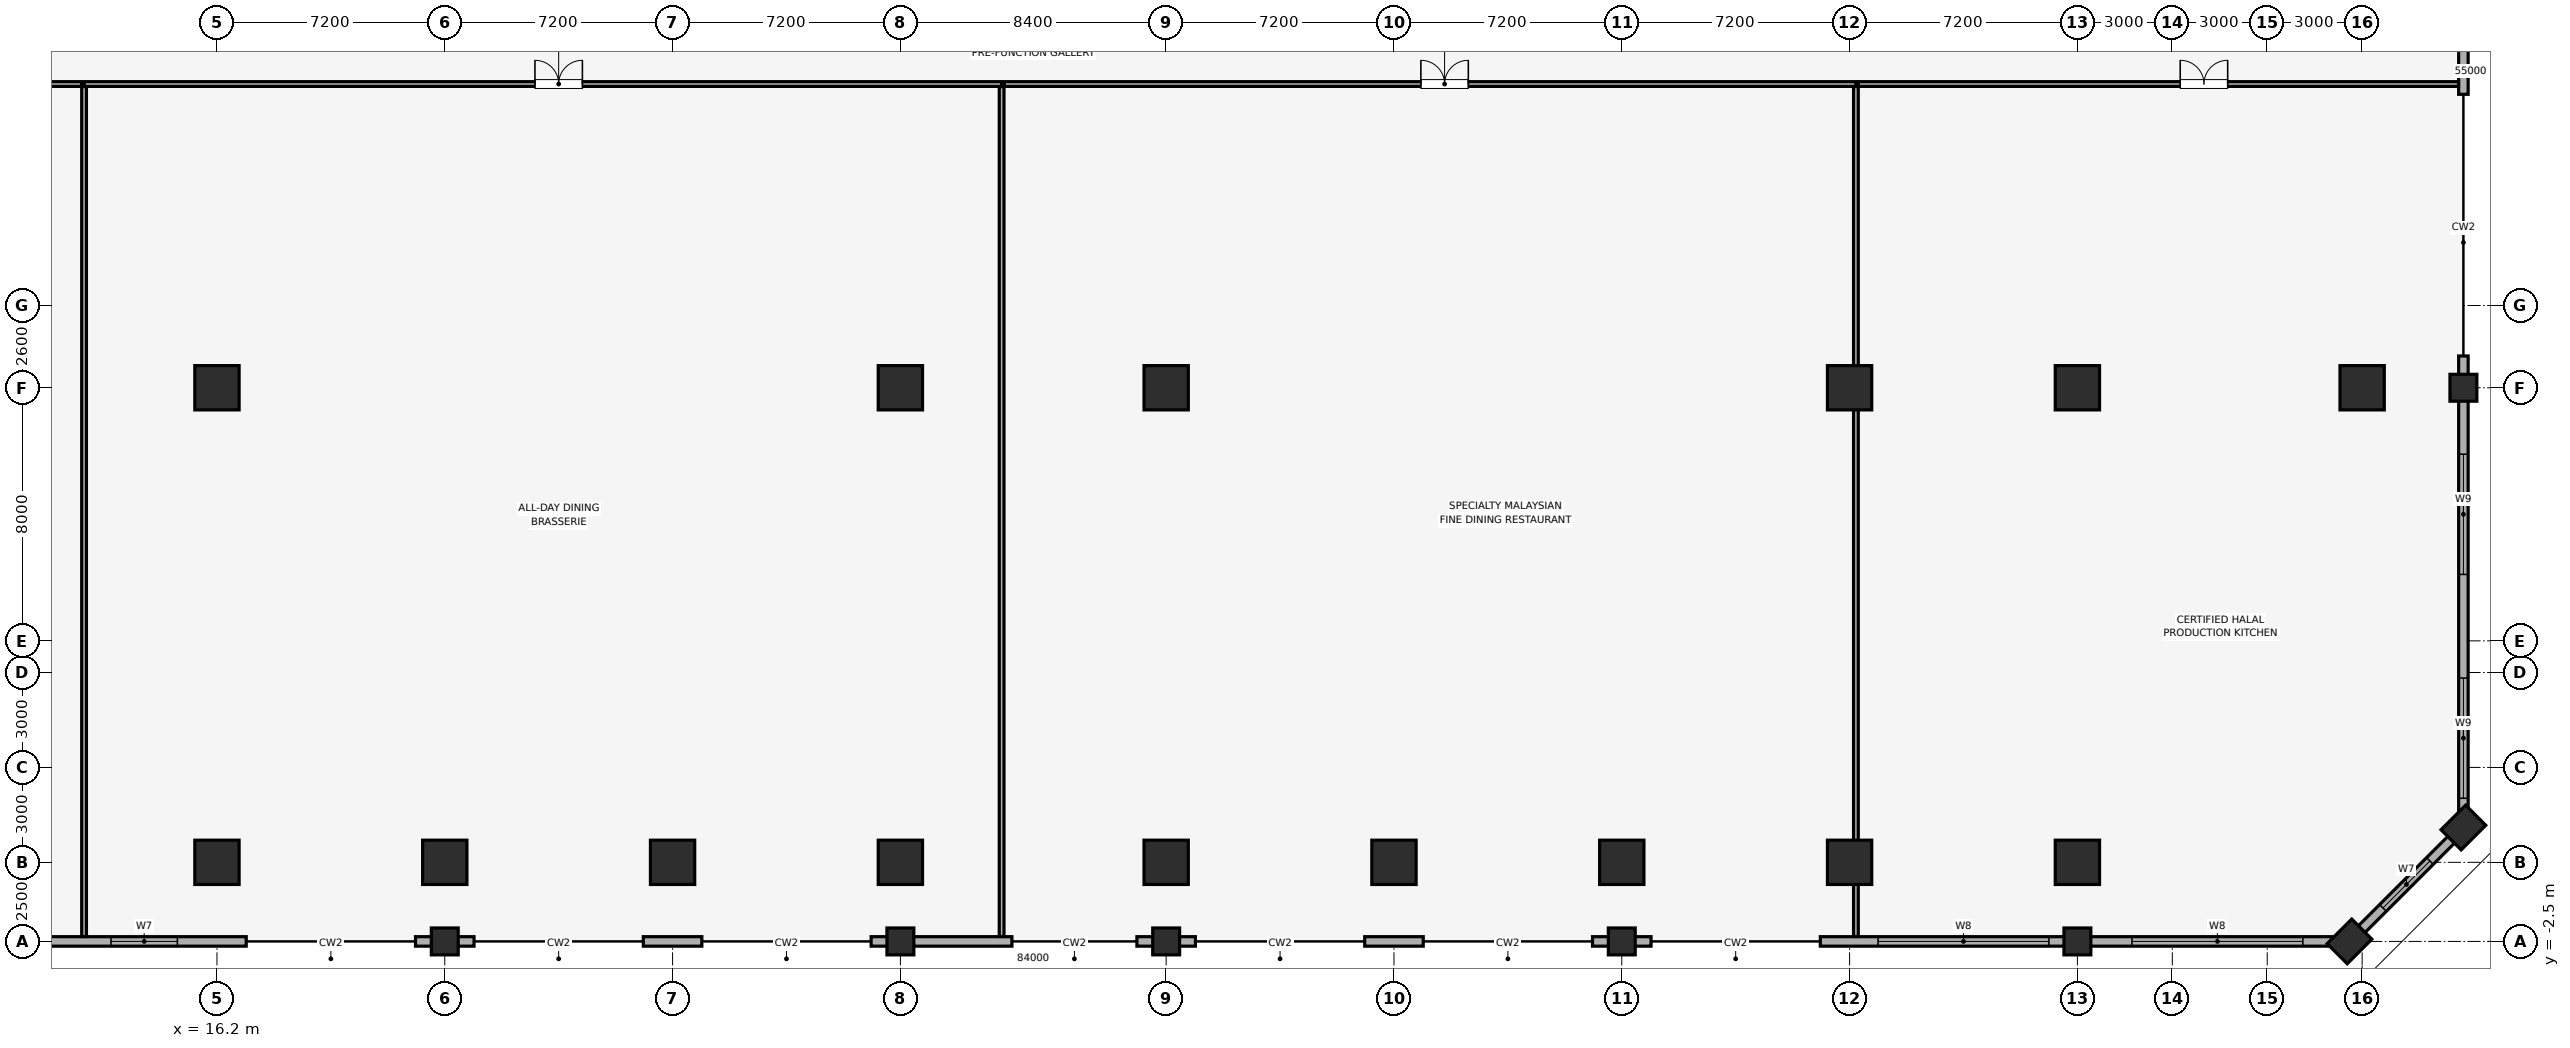
"""IFC4 building model, lengths in metres.
Left out: names, types, materials, properties, quantities, classifications, styles, units other than length and angle.
Written with IfcOpenShell. Run it as: python <this file> out.ifc"""

import sys

from ifc_helpers import new_model, si_unit, direction, frame, frame_2d, origin, origin_2d, place, context, subcontext, project, spatial, rectangle, extrude, element, fill, save


model = new_model("IFC4")
c1 = context("Model", 3, precision=1e-05, world=origin(), true_north=direction((0.0, 1.0)))
c2 = subcontext(c1, "Body", "Model", "MODEL_VIEW")
j1 = project(units=[si_unit("LENGTHUNIT", "METRE"), si_unit("PLANEANGLEUNIT", "RADIAN")], contexts=[c1])
p1 = place(None, origin())
s1 = spatial("IfcSite", under=j1, at=p1, CompositionType="ELEMENT")
p2 = place(p1, origin())
s2 = spatial("IfcBuilding", under=s1, at=p2, CompositionType="ELEMENT")
p3 = place(p2, frame((0.0, 0.0, 14.0)))
s3 = spatial("IfcBuildingStorey", under=s2, at=p3, CompositionType="ELEMENT", Elevation=14.0)
for number, where, z_axis, x_axis in (
    (1, (23.4, -2.5, 0.0), (0.0, 0.0, 1.0), (1.0, 0.0, 0.0)),
    (2, (37.8, -2.5, 0.0), (0.0, 0.0, 1.0), (1.0, 0.0, 0.0)),
    (3, (46.2, -2.5, 0.0), (0.0, 0.0, 1.0), (1.0, 0.0, 0.0)),
    (4, (60.6, -2.5, 0.0), (0.0, 0.0, 1.0), (1.0, 0.0, 0.0)),
    (5, (75.0, -2.5, 0.0), (0.0, 0.0, 1.0), (1.0, 0.0, 0.0)),
    (6, (87.2, 15.0, 0.0), (0.0, 0.0, 1.0), (1.0, 0.0, 0.0)),
):
    element("IfcColumn", number, at=place(p3, frame(where, z_axis=z_axis, x_axis=x_axis)), inside=s3, PredefinedType="COLUMN", context=c2, shape_type="SweptSolid", body=[
        extrude(rectangle(XDim=0.85, YDim=0.85, at=origin_2d()), origin(), (0.0, 0.0, 1.0), 5.08),
    ])
for number, where, z_axis, x_axis in (
    (7, (83.6, -2.5, 0.0), (0.0, 0.0, 1.0), (0.707, 0.707, 0.0)),
    (8, (87.2, 1.1, 0.0), (0.0, 0.0, 1.0), (0.707, 0.707, 0.0)),
):
    element("IfcColumn", number, at=place(p3, frame(where, z_axis=z_axis, x_axis=x_axis)), inside=s3, PredefinedType="PILASTER", context=c2, shape_type="SweptSolid", body=[
        extrude(rectangle(XDim=1.1, YDim=0.9, at=origin_2d()), origin(), (0.0, 0.0, 1.0), 5.08),
    ])
for number, where, z_axis, x_axis in (
    (9, (16.2, 0.0, 0.0), (0.0, 0.0, 1.0), (1.0, 0.0, 0.0)),
    (10, (23.4, 0.0, 0.0), (0.0, 0.0, 1.0), (1.0, 0.0, 0.0)),
    (11, (30.6, 0.0, 0.0), (0.0, 0.0, 1.0), (1.0, 0.0, 0.0)),
    (12, (37.8, 0.0, 0.0), (0.0, 0.0, 1.0), (1.0, 0.0, 0.0)),
    (13, (46.2, 0.0, 0.0), (0.0, 0.0, 1.0), (1.0, 0.0, 0.0)),
    (14, (53.4, 0.0, 0.0), (0.0, 0.0, 1.0), (1.0, 0.0, 0.0)),
    (15, (60.6, 0.0, 0.0), (0.0, 0.0, 1.0), (1.0, 0.0, 0.0)),
    (16, (67.8, 0.0, 0.0), (0.0, 0.0, 1.0), (1.0, 0.0, 0.0)),
    (17, (75.0, 0.0, 0.0), (0.0, 0.0, 1.0), (1.0, 0.0, 0.0)),
    (18, (37.8, 15.0, 0.0), (0.0, 0.0, 1.0), (1.0, 0.0, 0.0)),
    (19, (46.2, 15.0, 0.0), (0.0, 0.0, 1.0), (1.0, 0.0, 0.0)),
    (20, (75.0, 15.0, 0.0), (0.0, 0.0, 1.0), (1.0, 0.0, 0.0)),
    (21, (16.2, 15.0, 0.0), (0.0, 0.0, 1.0), (1.0, 0.0, 0.0)),
    (22, (67.8, 15.0, 0.0), (0.0, 0.0, 1.0), (1.0, 0.0, 0.0)),
    (23, (84.0, 15.0, 0.0), (0.0, 0.0, 1.0), (1.0, 0.0, 0.0)),
):
    element("IfcColumn", number, at=place(p3, frame(where, z_axis=z_axis, x_axis=x_axis)), inside=s3, PredefinedType="COLUMN", context=c2, shape_type="SweptSolid", body=[
        extrude(rectangle(XDim=1.4, YDim=1.4, at=origin_2d()), origin(), (0.0, 0.0, 1.0), 5.08),
    ])
p4 = place(p3, frame((0.4, -2.5, 0.0), z_axis=(0.0, 0.0, 1.0), x_axis=(1.0, 0.0, 0.0)))
e24 = element("IfcWall", 24, at=p4, inside=s3, PredefinedType="SOLIDWALL", context=c2, shape_type="SweptSolid", body=[
    extrude(rectangle(XDim=16.725, YDim=0.3, at=frame_2d((8.363, 0.0))), origin(), (0.0, 0.0, 1.0), 4.13),
])
p5 = place(p4, frame((1.475, 0.0, 0.85)))
e25 = element("IfcOpeningElement", 25, at=p5, cuts=e24, PredefinedType="OPENING", context=c2, shape_type="SweptSolid", body=[
    extrude(rectangle(XDim=5.4, YDim=2.4, at=frame_2d((2.7, 1.2))), frame((0.0, 0.16, 0.0), z_axis=(0.0, -1.0, 0.0), x_axis=(1.0, 0.0, 0.0)), (0.0, 0.0, 1.0), 0.32),
])
p6 = place(p4, frame((12.45, 0.0, 0.85)))
e26 = element("IfcOpeningElement", 26, at=p6, cuts=e24, PredefinedType="OPENING", context=c2, shape_type="SweptSolid", body=[
    extrude(rectangle(XDim=2.1, YDim=1.6, at=frame_2d((1.05, 0.8))), frame((0.0, 0.16, 0.0), z_axis=(0.0, -1.0, 0.0), x_axis=(1.0, 0.0, 0.0)), (0.0, 0.0, 1.0), 0.32),
])
for number, where, z_axis, x_axis in (
    (27, (22.475, -2.5, 0.0), (0.0, 0.0, 1.0), (1.0, 0.0, 0.0)),
    (28, (29.675, -2.5, 0.0), (0.0, 0.0, 1.0), (1.0, 0.0, 0.0)),
):
    element("IfcWall", number, at=place(p3, frame(where, z_axis=z_axis, x_axis=x_axis)), inside=s3, PredefinedType="SOLIDWALL", context=c2, shape_type="SweptSolid", body=[
        extrude(rectangle(XDim=1.85, YDim=0.3, at=frame_2d((0.925, 0.0))), origin(), (0.0, 0.0, 1.0), 4.13),
    ])
p7 = place(p3, frame((36.875, -2.5, 0.0), z_axis=(0.0, 0.0, 1.0), x_axis=(1.0, 0.0, 0.0)))
e29 = element("IfcWall", 29, at=p7, inside=s3, PredefinedType="SOLIDWALL", context=c2, shape_type="SweptSolid", body=[
    extrude(rectangle(XDim=4.45, YDim=0.3, at=frame_2d((2.225, 0.0))), origin(), (0.0, 0.0, 1.0), 4.13),
])
p8 = place(p3, frame((45.275, -2.5, 0.0), z_axis=(0.0, 0.0, 1.0), x_axis=(1.0, 0.0, 0.0)))
e30 = element("IfcWall", 30, at=p8, inside=s3, PredefinedType="SOLIDWALL", context=c2, shape_type="SweptSolid", body=[
    extrude(rectangle(XDim=1.85, YDim=0.3, at=frame_2d((0.925, 0.0))), origin(), (0.0, 0.0, 1.0), 4.13),
])
for number, where, z_axis, x_axis in (
    (31, (52.475, -2.5, 0.0), (0.0, 0.0, 1.0), (1.0, 0.0, 0.0)),
    (32, (59.675, -2.5, 0.0), (0.0, 0.0, 1.0), (1.0, 0.0, 0.0)),
):
    element("IfcWall", number, at=place(p3, frame(where, z_axis=z_axis, x_axis=x_axis)), inside=s3, PredefinedType="SOLIDWALL", context=c2, shape_type="SweptSolid", body=[
        extrude(rectangle(XDim=1.85, YDim=0.3, at=frame_2d((0.925, 0.0))), origin(), (0.0, 0.0, 1.0), 4.13),
    ])
p9 = place(p3, frame((66.875, -2.5, 0.0), z_axis=(0.0, 0.0, 1.0), x_axis=(1.0, 0.0, 0.0)))
e33 = element("IfcWall", 33, at=p9, inside=s3, PredefinedType="SOLIDWALL", context=c2, shape_type="SweptSolid", body=[
    extrude(rectangle(XDim=16.725, YDim=0.3, at=frame_2d((8.363, 0.0))), origin(), (0.0, 0.0, 1.0), 4.13),
])
p10 = place(p9, frame((1.825, 0.0, 0.85)))
e34 = element("IfcOpeningElement", 34, at=p10, cuts=e33, PredefinedType="OPENING", context=c2, shape_type="SweptSolid", body=[
    extrude(rectangle(XDim=5.4, YDim=2.4, at=frame_2d((2.7, 1.2))), frame((0.0, 0.16, 0.0), z_axis=(0.0, -1.0, 0.0), x_axis=(1.0, 0.0, 0.0)), (0.0, 0.0, 1.0), 0.32),
])
p11 = place(p9, frame((9.85, 0.0, 0.85)))
e35 = element("IfcOpeningElement", 35, at=p11, cuts=e33, PredefinedType="OPENING", context=c2, shape_type="SweptSolid", body=[
    extrude(rectangle(XDim=5.4, YDim=2.4, at=frame_2d((2.7, 1.2))), frame((0.0, 0.16, 0.0), z_axis=(0.0, -1.0, 0.0), x_axis=(1.0, 0.0, 0.0)), (0.0, 0.0, 1.0), 0.32),
])
p12 = place(p3, frame((83.6, -2.5, 0.0), z_axis=(0.0, 0.0, 1.0), x_axis=(0.707082803744, 0.707130757816, 0.0)))
e36 = element("IfcWall", 36, at=p12, inside=s3, PredefinedType="SOLIDWALL", context=c2, shape_type="SweptSolid", body=[
    extrude(rectangle(XDim=5.091, YDim=0.3, at=frame_2d((2.545, 0.0))), origin(), (0.0, 0.0, 1.0), 4.13),
])
p13 = place(p12, frame((1.496, 0.0, 0.85)))
e37 = element("IfcOpeningElement", 37, at=p13, cuts=e36, PredefinedType="OPENING", context=c2, shape_type="SweptSolid", body=[
    extrude(rectangle(XDim=2.1, YDim=1.6, at=frame_2d((1.05, 0.8))), frame((0.0, 0.16, 0.0), z_axis=(0.0, -1.0, 0.0), x_axis=(1.0, 0.0, 0.0)), (0.0, 0.0, 1.0), 0.32),
])
p14 = place(p3, frame((87.2, 1.1, 0.0), z_axis=(0.0, 0.0, 1.0), x_axis=(0.0, 1.0, 0.0)))
e38 = element("IfcWall", 38, at=p14, inside=s3, PredefinedType="SOLIDWALL", context=c2, shape_type="SweptSolid", body=[
    extrude(rectangle(XDim=14.905, YDim=0.3, at=frame_2d((7.452, 0.0))), origin(), (0.0, 0.0, 1.0), 4.13),
])
p15 = place(p14, frame((0.925, 0.0, 0.85)))
e39 = element("IfcOpeningElement", 39, at=p15, cuts=e38, PredefinedType="OPENING", context=c2, shape_type="SweptSolid", body=[
    extrude(rectangle(XDim=3.8, YDim=2.2, at=frame_2d((1.9, 1.1))), frame((0.0, 0.16, 0.0), z_axis=(0.0, -1.0, 0.0), x_axis=(1.0, 0.0, 0.0)), (0.0, 0.0, 1.0), 0.32),
])
p16 = place(p14, frame((8.0, 0.0, 0.85)))
e40 = element("IfcOpeningElement", 40, at=p16, cuts=e38, PredefinedType="OPENING", context=c2, shape_type="SweptSolid", body=[
    extrude(rectangle(XDim=3.8, YDim=2.2, at=frame_2d((1.9, 1.1))), frame((0.0, 0.16, 0.0), z_axis=(0.0, -1.0, 0.0), x_axis=(1.0, 0.0, 0.0)), (0.0, 0.0, 1.0), 0.32),
])
p17 = place(p3, frame((87.2, 24.275, 0.0), z_axis=(0.0, 0.0, 1.0), x_axis=(0.0, 1.0, 0.0)))
e41 = element("IfcWall", 41, at=p17, inside=s3, PredefinedType="SOLIDWALL", context=c2, shape_type="SweptSolid", body=[
    extrude(rectangle(XDim=24.625, YDim=0.3, at=frame_2d((12.312, 0.0))), origin(), (0.0, 0.0, 1.0), 4.13),
])
p18 = place(p17, frame((8.725, 0.0, 0.85)))
e42 = element("IfcOpeningElement", 42, at=p18, cuts=e41, PredefinedType="OPENING", context=c2, shape_type="SweptSolid", body=[
    extrude(rectangle(XDim=3.8, YDim=2.2, at=frame_2d((1.9, 1.1))), frame((0.0, 0.16, 0.0), z_axis=(0.0, -1.0, 0.0), x_axis=(1.0, 0.0, 0.0)), (0.0, 0.0, 1.0), 0.32),
])
p19 = place(p17, frame((16.625, 0.0, 0.85)))
e43 = element("IfcOpeningElement", 43, at=p19, cuts=e41, PredefinedType="OPENING", context=c2, shape_type="SweptSolid", body=[
    extrude(rectangle(XDim=3.8, YDim=2.2, at=frame_2d((1.9, 1.1))), frame((0.0, 0.16, 0.0), z_axis=(0.0, -1.0, 0.0), x_axis=(1.0, 0.0, 0.0)), (0.0, 0.0, 1.0), 0.32),
])
p20 = place(p3, frame((12.0, 24.6, 0.0), z_axis=(0.0, 0.0, 1.0), x_axis=(1.0, 0.0, 0.0)))
e44 = element("IfcWall", 44, at=p20, inside=s3, PredefinedType="PARTITIONING", context=c2, shape_type="SweptSolid", body=[
    extrude(rectangle(XDim=29.0, YDim=0.15, at=frame_2d((14.5, 0.0))), origin(), (0.0, 0.0, 1.0), 5.08),
])
p21 = place(p20, frame((14.25, 0.0, 0.0)))
e45 = element("IfcOpeningElement", 45, at=p21, cuts=e44, PredefinedType="OPENING", context=c2, shape_type="SweptSolid", body=[
    extrude(rectangle(XDim=1.5, YDim=2.25, at=frame_2d((0.75, 1.125))), frame((0.0, 0.085, 0.0), z_axis=(0.0, -1.0, 0.0), x_axis=(1.0, 0.0, 0.0)), (0.0, 0.0, 1.0), 0.17),
])
for number, where, z_axis, x_axis in (
    (46, (12.0, -2.345, 0.0), (0.0, 0.0, 1.0), (0.0, 1.0, 0.0)),
    (47, (41.0, -2.345, 0.0), (0.0, 0.0, 1.0), (0.0, 1.0, 0.0)),
):
    element("IfcWall", number, at=place(p3, frame(where, z_axis=z_axis, x_axis=x_axis)), inside=s3, PredefinedType="PARTITIONING", context=c2, shape_type="SweptSolid", body=[
        extrude(rectangle(XDim=26.865, YDim=0.15, at=frame_2d((13.433, 0.0))), origin(), (0.0, 0.0, 1.0), 5.08),
    ])
p22 = place(p3, frame((41.08, 24.6, 0.0), z_axis=(0.0, 0.0, 1.0), x_axis=(1.0, 0.0, 0.0)))
e48 = element("IfcWall", 48, at=p22, inside=s3, PredefinedType="PARTITIONING", context=c2, shape_type="SweptSolid", body=[
    extrude(rectangle(XDim=26.92, YDim=0.15, at=frame_2d((13.46, 0.0))), origin(), (0.0, 0.0, 1.0), 5.08),
])
p23 = place(p22, frame((13.17, 0.0, 0.0)))
e49 = element("IfcOpeningElement", 49, at=p23, cuts=e48, PredefinedType="OPENING", context=c2, shape_type="SweptSolid", body=[
    extrude(rectangle(XDim=1.5, YDim=2.25, at=frame_2d((0.75, 1.125))), frame((0.0, 0.085, 0.0), z_axis=(0.0, -1.0, 0.0), x_axis=(1.0, 0.0, 0.0)), (0.0, 0.0, 1.0), 0.17),
])
p24 = place(p3, frame((68.0, -2.345, 0.0), z_axis=(0.0, 0.0, 1.0), x_axis=(0.0, 1.0, 0.0)))
e50 = element("IfcWall", 50, at=p24, inside=s3, PredefinedType="PARTITIONING", context=c2, shape_type="SweptSolid", body=[
    extrude(rectangle(XDim=26.865, YDim=0.15, at=frame_2d((13.433, 0.0))), origin(), (0.0, 0.0, 1.0), 4.393),
])
p25 = place(p3, frame((-3.045, 24.6, 0.0), z_axis=(0.0, 0.0, 1.0), x_axis=(1.0, 0.0, 0.0)))
e51 = element("IfcWall", 51, at=p25, inside=s3, PredefinedType="PARTITIONING", context=c2, shape_type="SweptSolid", body=[
    extrude(rectangle(XDim=14.965, YDim=0.15, at=frame_2d((7.482, 0.0))), origin(), (0.0, 0.0, 1.0), 5.08),
])
p26 = place(p25, frame((6.795, 0.0, 0.0)))
e52 = element("IfcOpeningElement", 52, at=p26, cuts=e51, PredefinedType="OPENING", context=c2, shape_type="SweptSolid", body=[
    extrude(rectangle(XDim=1.5, YDim=2.25, at=frame_2d((0.75, 1.125))), frame((0.0, 0.085, 0.0), z_axis=(0.0, -1.0, 0.0), x_axis=(1.0, 0.0, 0.0)), (0.0, 0.0, 1.0), 0.17),
])
p27 = place(p3, frame((68.08, 24.6, 0.0), z_axis=(0.0, 0.0, 1.0), x_axis=(1.0, 0.0, 0.0)))
e53 = element("IfcWall", 53, at=p27, inside=s3, PredefinedType="PARTITIONING", context=c2, shape_type="SweptSolid", body=[
    extrude(rectangle(XDim=18.965, YDim=0.15, at=frame_2d((9.482, 0.0))), origin(), (0.0, 0.0, 1.0), 5.08),
])
p28 = place(p27, frame((10.17, 0.0, 0.0)))
e54 = element("IfcOpeningElement", 54, at=p28, cuts=e53, PredefinedType="OPENING", context=c2, shape_type="SweptSolid", body=[
    extrude(rectangle(XDim=1.5, YDim=2.25, at=frame_2d((0.75, 1.125))), frame((0.0, 0.085, 0.0), z_axis=(0.0, -1.0, 0.0), x_axis=(1.0, 0.0, 0.0)), (0.0, 0.0, 1.0), 0.17),
])
p29 = place(p13, origin())
e55 = element("IfcWindow", 55, at=p29, inside=s3, PartitioningType="SINGLE_PANEL", PredefinedType="WINDOW", context=c2, shape_type="SweptSolid", body=[
    extrude(rectangle(XDim=2.1, YDim=1.6, at=frame_2d((1.05, 0.8))), frame((0.0, 0.03, 0.0), z_axis=(0.0, -1.0, 0.0), x_axis=(1.0, 0.0, 0.0)), (0.0, 0.0, 1.0), 0.06),
])
fill(e37, e55)
p30 = place(p6, origin())
e56 = element("IfcWindow", 56, at=p30, inside=s3, PartitioningType="SINGLE_PANEL", PredefinedType="WINDOW", context=c2, shape_type="SweptSolid", body=[
    extrude(rectangle(XDim=2.1, YDim=1.6, at=frame_2d((1.05, 0.8))), frame((0.0, 0.03, 0.0), z_axis=(0.0, -1.0, 0.0), x_axis=(1.0, 0.0, 0.0)), (0.0, 0.0, 1.0), 0.06),
])
fill(e26, e56)
p31 = place(p10, origin())
e57 = element("IfcWindow", 57, at=p31, inside=s3, PartitioningType="SINGLE_PANEL", PredefinedType="WINDOW", context=c2, shape_type="SweptSolid", body=[
    extrude(rectangle(XDim=5.4, YDim=2.4, at=frame_2d((2.7, 1.2))), frame((0.0, 0.03, 0.0), z_axis=(0.0, -1.0, 0.0), x_axis=(1.0, 0.0, 0.0)), (0.0, 0.0, 1.0), 0.06),
])
fill(e34, e57)
p32 = place(p11, origin())
e58 = element("IfcWindow", 58, at=p32, inside=s3, PartitioningType="SINGLE_PANEL", PredefinedType="WINDOW", context=c2, shape_type="SweptSolid", body=[
    extrude(rectangle(XDim=5.4, YDim=2.4, at=frame_2d((2.7, 1.2))), frame((0.0, 0.03, 0.0), z_axis=(0.0, -1.0, 0.0), x_axis=(1.0, 0.0, 0.0)), (0.0, 0.0, 1.0), 0.06),
])
fill(e35, e58)
p33 = place(p15, origin())
e59 = element("IfcWindow", 59, at=p33, inside=s3, PartitioningType="SINGLE_PANEL", PredefinedType="WINDOW", context=c2, shape_type="SweptSolid", body=[
    extrude(rectangle(XDim=3.8, YDim=2.2, at=frame_2d((1.9, 1.1))), frame((0.0, 0.03, 0.0), z_axis=(0.0, -1.0, 0.0), x_axis=(1.0, 0.0, 0.0)), (0.0, 0.0, 1.0), 0.06),
])
fill(e39, e59)
p34 = place(p16, origin())
e60 = element("IfcWindow", 60, at=p34, inside=s3, PartitioningType="SINGLE_PANEL", PredefinedType="WINDOW", context=c2, shape_type="SweptSolid", body=[
    extrude(rectangle(XDim=3.8, YDim=2.2, at=frame_2d((1.9, 1.1))), frame((0.0, 0.03, 0.0), z_axis=(0.0, -1.0, 0.0), x_axis=(1.0, 0.0, 0.0)), (0.0, 0.0, 1.0), 0.06),
])
fill(e40, e60)
p35 = place(p21, origin())
e61 = element("IfcDoor", 61, at=p35, inside=s3, OperationType="DOUBLE_DOOR_SINGLE_SWING", PredefinedType="DOOR", context=c2, shape_type="SweptSolid", body=[
    extrude(rectangle(XDim=1.5, YDim=2.25, at=frame_2d((0.75, 1.125))), frame((0.0, 0.025, 0.0), z_axis=(0.0, -1.0, 0.0), x_axis=(1.0, 0.0, 0.0)), (0.0, 0.0, 1.0), 0.05),
])
fill(e45, e61)
p36 = place(p23, origin())
e62 = element("IfcDoor", 62, at=p36, inside=s3, OperationType="DOUBLE_DOOR_SINGLE_SWING", PredefinedType="DOOR", context=c2, shape_type="SweptSolid", body=[
    extrude(rectangle(XDim=1.5, YDim=2.25, at=frame_2d((0.75, 1.125))), frame((0.0, 0.025, 0.0), z_axis=(0.0, -1.0, 0.0), x_axis=(1.0, 0.0, 0.0)), (0.0, 0.0, 1.0), 0.05),
])
fill(e49, e62)
p37 = place(p28, origin())
e63 = element("IfcDoor", 63, at=p37, inside=s3, OperationType="DOUBLE_DOOR_SINGLE_SWING", PredefinedType="DOOR", context=c2, shape_type="SweptSolid", body=[
    extrude(rectangle(XDim=1.5, YDim=2.25, at=frame_2d((0.75, 1.125))), frame((0.0, 0.025, 0.0), z_axis=(0.0, -1.0, 0.0), x_axis=(1.0, 0.0, 0.0)), (0.0, 0.0, 1.0), 0.05),
])
fill(e54, e63)
save(model, sys.argv[1])
